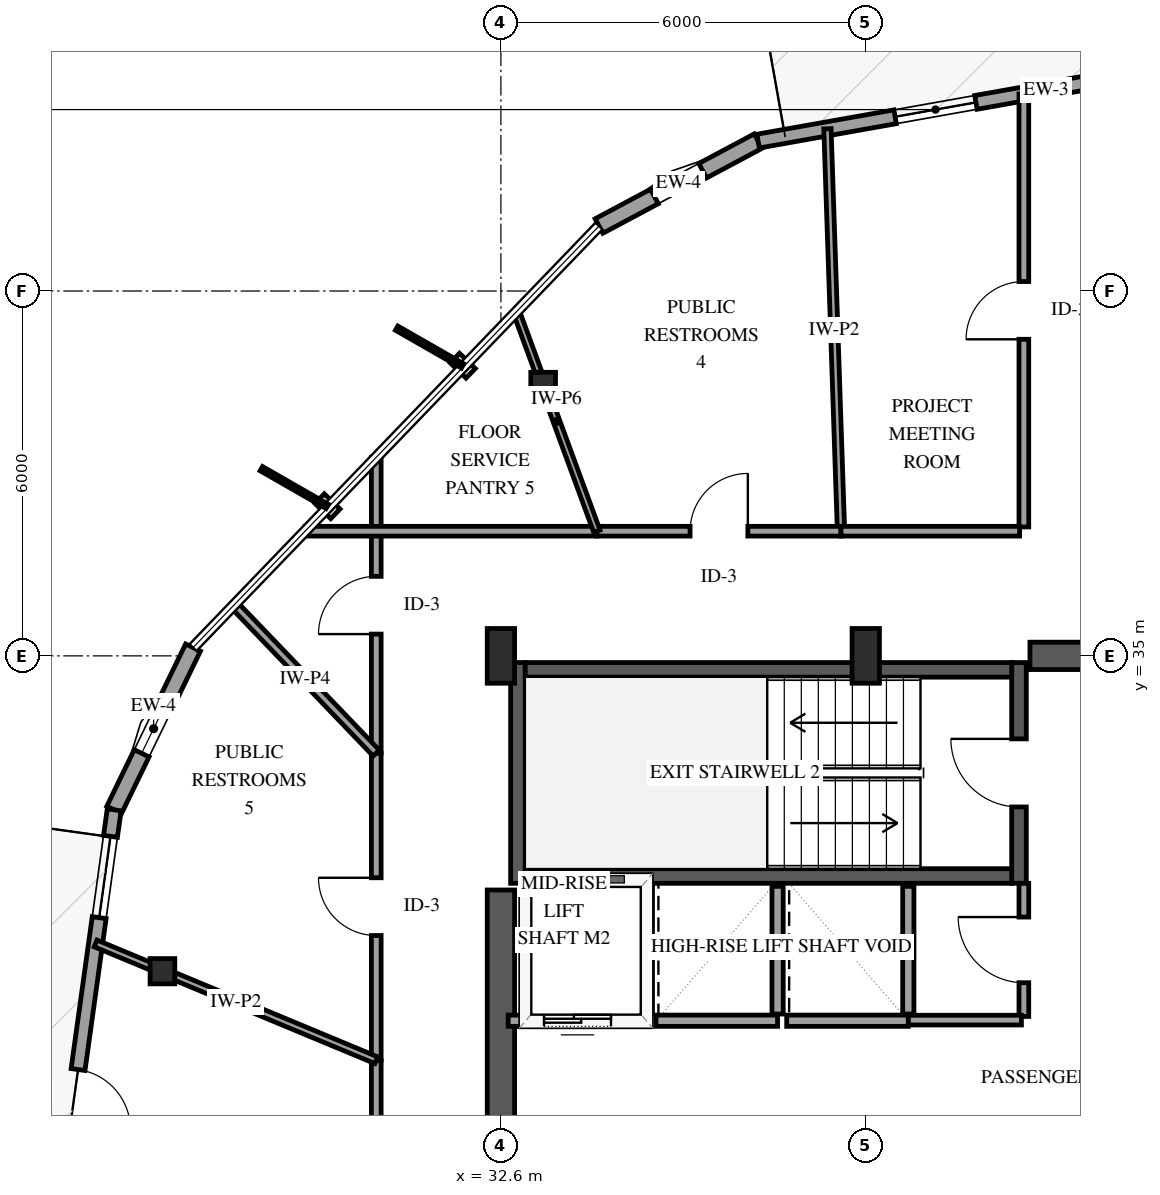
"""IFC4 building model, lengths in metres.
Left out: names, types, materials, properties, quantities, classifications, styles, units other than length and angle.
Written with IfcOpenShell. Run it as: python <this file> out.ifc"""

import sys

from ifc_helpers import new_model, si_unit, direction, frame, frame_2d, origin, origin_2d, place, context, subcontext, project, spatial, rectangle, i_section, extrude, element, fill, save


model = new_model("IFC4")
c1 = context("Model", 3, precision=1e-05, world=origin(), true_north=direction((0.0, 1.0)))
c2 = subcontext(c1, "Body", "Model", "MODEL_VIEW")
j1 = project(units=[si_unit("LENGTHUNIT", "METRE"), si_unit("PLANEANGLEUNIT", "RADIAN")], contexts=[c1])
p1 = place(None, origin())
s1 = spatial("IfcSite", under=j1, at=p1, CompositionType="ELEMENT")
p2 = place(p1, origin())
s2 = spatial("IfcBuilding", under=s1, at=p2, CompositionType="ELEMENT")
p3 = place(p2, frame((0.0, 0.0, 205.0)))
s3 = spatial("IfcBuildingStorey", under=s2, at=p3, CompositionType="ELEMENT", Elevation=205.0)
p4 = place(p3, frame((32.88, 31.26, 0.0), z_axis=(0.0, 0.0, 1.0), x_axis=(0.0, 1.0, 0.0)))
e1 = element("IfcWall", 1, at=p4, inside=s3, PredefinedType="SHEAR", context=c2, shape_type="SweptSolid", body=[
    extrude(rectangle(XDim=3.63, YDim=0.24, at=frame_2d((1.815, 0.0))), origin(), (0.0, 0.0, 1.0), 3.6),
])
p5 = place(p3, frame((41.12, 31.26, 0.0), z_axis=(0.0, 0.0, 1.0), x_axis=(0.0, 1.0, 0.0)))
e2 = element("IfcWall", 2, at=p5, inside=s3, PredefinedType="SHEAR", context=c2, shape_type="SweptSolid", body=[
    extrude(rectangle(XDim=3.63, YDim=0.24, at=frame_2d((1.815, 0.0))), origin(), (0.0, 0.0, 1.0), 3.6),
])
p6 = place(p5, frame((1.255, 0.0, 0.0)))
e3 = element("IfcOpeningElement", 3, at=p6, cuts=e2, PredefinedType="OPENING", context=c2, shape_type="SweptSolid", body=[
    extrude(rectangle(XDim=1.12, YDim=2.15, at=frame_2d((0.56, 1.075))), frame((0.0, 0.13, 0.0), z_axis=(0.0, -1.0, 0.0), x_axis=(1.0, 0.0, 0.0)), (0.0, 0.0, 1.0), 0.26),
])
for number, where, z_axis, x_axis in (
    (4, (33.0, 31.38, 0.0), (0.0, 0.0, 1.0), (1.0, 0.0, 0.0)),
    (5, (33.0, 34.77, 0.0), (0.0, 0.0, 1.0), (1.0, 0.0, 0.0)),
):
    element("IfcWall", number, at=place(p3, frame(where, z_axis=z_axis, x_axis=x_axis)), inside=s3, PredefinedType="SHEAR", context=c2, shape_type="SweptSolid", body=[
        extrude(rectangle(XDim=8.0, YDim=0.24, at=frame_2d((4.0, 0.0))), origin(), (0.0, 0.0, 1.0), 3.6),
    ])
p7 = place(p3, frame((32.6, 18.85, 0.0), z_axis=(0.0, 0.0, 1.0), x_axis=(0.0, 1.0, 0.0)))
e6 = element("IfcWall", 6, at=p7, inside=s3, PredefinedType="SHEAR", context=c2, shape_type="SweptSolid", body=[
    extrude(rectangle(XDim=12.3, YDim=0.45, at=frame_2d((6.15, 0.0))), origin(), (0.0, 0.0, 1.0), 3.6),
])
p8 = place(p3, frame((41.3, 35.0, 0.0), z_axis=(0.0, 0.0, 1.0), x_axis=(1.0, 0.0, 0.0)))
e7 = element("IfcWall", 7, at=p8, inside=s3, PredefinedType="SHEAR", context=c2, shape_type="SweptSolid", body=[
    extrude(rectangle(XDim=2.85, YDim=0.45, at=frame_2d((1.425, 0.0))), origin(), (0.0, 0.0, 1.0), 3.6),
])
for number, where, z_axis, x_axis in (
    (8, (32.6, 35.0, 0.0), (0.0, 0.0, 1.0), (1.0, 0.0, 0.0)),
    (9, (38.6, 35.0, 0.0), (0.0, 0.0, 1.0), (1.0, 0.0, 0.0)),
):
    element("IfcColumn", number, at=place(p3, frame(where, z_axis=z_axis, x_axis=x_axis)), inside=s3, PredefinedType="PILASTER", context=c2, shape_type="SweptSolid", body=[
        extrude(rectangle(XDim=0.45, YDim=0.9, at=origin_2d()), origin(), (0.0, 0.0, 1.0), 3.6),
    ])
for number, where, z_axis, x_axis in (
    (10, (33.295, 39.455, 0.0), (0.0, 0.0, 1.0), (1.0, 0.0, 0.0)),
    (11, (27.034, 29.814, 0.0), (0.0, 0.0, 1.0), (1.0, 0.0, 0.0)),
):
    element("IfcColumn", number, at=place(p3, frame(where, z_axis=z_axis, x_axis=x_axis)), inside=s3, PredefinedType="COLUMN", context=c2, shape_type="SweptSolid", body=[
        extrude(i_section(OverallWidth=0.406, OverallDepth=0.416, WebThickness=0.03, FlangeThickness=0.048, FilletRadius=0.038, at=origin_2d()), origin(), (0.0, 0.0, 1.0), 3.6),
    ])
p9 = place(p3, frame((36.83, 43.465, 0.0), z_axis=(0.0, 0.0, 1.0), x_axis=(-0.882280032982, -0.470724912663, 0.0)))
e12 = element("IfcWall", 12, at=p9, inside=s3, PredefinedType="SOLIDWALL", context=c2, shape_type="SweptSolid", body=[
    extrude(rectangle(XDim=2.967, YDim=0.27, at=frame_2d((1.483, 0.0))), origin(), (0.0, 0.0, 1.0), 2.679),
])
p10 = place(p9, frame((1.033, 0.0, 0.75)))
e13 = element("IfcOpeningElement", 13, at=p10, cuts=e12, PredefinedType="OPENING", context=c2, shape_type="SweptSolid", body=[
    extrude(rectangle(XDim=0.9, YDim=1.5, at=frame_2d((0.45, 0.75))), frame((0.0, 0.145, 0.0), z_axis=(0.0, -1.0, 0.0), x_axis=(1.0, 0.0, 0.0)), (0.0, 0.0, 1.0), 0.29),
])
p11 = place(p3, frame((46.306, 45.149, 0.0), z_axis=(0.0, 0.0, 1.0), x_axis=(-0.984566490569, -0.175010930084, 0.0)))
e14 = element("IfcWall", 14, at=p11, inside=s3, PredefinedType="SOLIDWALL", context=c2, shape_type="SweptSolid", body=[
    extrude(rectangle(XDim=9.624, YDim=0.23, at=frame_2d((4.812, 0.0))), origin(), (0.0, 0.0, 1.0), 2.679),
])
p12 = place(p11, frame((0.65, 0.0, 0.0)))
e15 = element("IfcOpeningElement", 15, at=p12, cuts=e14, PredefinedType="OPENING", context=c2, shape_type="SweptSolid", body=[
    extrude(rectangle(XDim=1.0, YDim=2.15, at=frame_2d((0.5, 1.075))), frame((0.0, 0.125, 0.0), z_axis=(0.0, -1.0, 0.0), x_axis=(1.0, 0.0, 0.0)), (0.0, 0.0, 1.0), 0.25),
])
p13 = place(p11, frame((5.986, 0.0, 0.72)))
e16 = element("IfcOpeningElement", 16, at=p13, cuts=e14, PredefinedType="OPENING", context=c2, shape_type="SweptSolid", body=[
    extrude(rectangle(XDim=1.35, YDim=1.65, at=frame_2d((0.675, 0.825))), frame((0.0, 0.125, 0.0), z_axis=(0.0, -1.0, 0.0), x_axis=(1.0, 0.0, 0.0)), (0.0, 0.0, 1.0), 0.25),
])
p14 = place(p3, frame((27.537, 35.136, 0.0), z_axis=(0.0, 0.0, 1.0), x_axis=(-0.437111339514, -0.899407403165, 0.0)))
e17 = element("IfcWall", 17, at=p14, inside=s3, PredefinedType="SOLIDWALL", context=c2, shape_type="SweptSolid", body=[
    extrude(rectangle(XDim=2.966, YDim=0.27, at=frame_2d((1.483, 0.0))), origin(), (0.0, 0.0, 1.0), 2.679),
])
p15 = place(p14, frame((1.033, 0.0, 0.75)))
e18 = element("IfcOpeningElement", 18, at=p15, cuts=e17, PredefinedType="OPENING", context=c2, shape_type="SweptSolid", body=[
    extrude(rectangle(XDim=0.9, YDim=1.5, at=frame_2d((0.45, 0.75))), frame((0.0, 0.145, 0.0), z_axis=(0.0, -1.0, 0.0), x_axis=(1.0, 0.0, 0.0)), (0.0, 0.0, 1.0), 0.29),
])
p16 = place(p3, frame((26.24, 32.468, 0.0), z_axis=(0.0, 0.0, 1.0), x_axis=(-0.137794425401, -0.990460850477, 0.0)))
e19 = element("IfcWall", 19, at=p16, inside=s3, PredefinedType="SOLIDWALL", context=c2, shape_type="SweptSolid", body=[
    extrude(rectangle(XDim=9.624, YDim=0.23, at=frame_2d((4.812, 0.0))), origin(), (0.0, 0.0, 1.0), 2.679),
])
p17 = place(p16, frame((4.312, 0.0, 0.0)))
e20 = element("IfcOpeningElement", 20, at=p17, cuts=e19, PredefinedType="OPENING", context=c2, shape_type="SweptSolid", body=[
    extrude(rectangle(XDim=1.0, YDim=2.15, at=frame_2d((0.5, 1.075))), frame((0.0, 0.125, 0.0), z_axis=(0.0, -1.0, 0.0), x_axis=(1.0, 0.0, 0.0)), (0.0, 0.0, 1.0), 0.25),
])
p18 = place(p16, frame((0.44, 0.0, 0.72)))
e21 = element("IfcOpeningElement", 21, at=p18, cuts=e19, PredefinedType="OPENING", context=c2, shape_type="SweptSolid", body=[
    extrude(rectangle(XDim=1.35, YDim=1.65, at=frame_2d((0.675, 0.825))), frame((0.0, 0.125, 0.0), z_axis=(0.0, -1.0, 0.0), x_axis=(1.0, 0.0, 0.0)), (0.0, 0.0, 1.0), 0.25),
])
p19 = place(p16, frame((5.952, 0.0, 0.72)))
e22 = element("IfcOpeningElement", 22, at=p19, cuts=e19, PredefinedType="OPENING", context=c2, shape_type="SweptSolid", body=[
    extrude(rectangle(XDim=1.35, YDim=1.65, at=frame_2d((0.675, 0.825))), frame((0.0, 0.125, 0.0), z_axis=(0.0, -1.0, 0.0), x_axis=(1.0, 0.0, 0.0)), (0.0, 0.0, 1.0), 0.25),
])
p20 = place(p3, frame((32.72, 29.0, 0.0), z_axis=(0.0, 0.0, 1.0), x_axis=(1.0, 0.0, 0.0)))
e23 = element("IfcWall", 23, at=p20, inside=s3, PredefinedType="SOLIDWALL", context=c2, shape_type="SweptSolid", body=[
    extrude(rectangle(XDim=2.28, YDim=0.185, at=frame_2d((1.14, 0.0))), origin(), (0.0, 0.0, 1.0), 3.3),
])
p21 = place(p20, frame((0.59, 0.0, 0.0)))
e24 = element("IfcOpeningElement", 24, at=p21, cuts=e23, PredefinedType="OPENING", context=c2, shape_type="SweptSolid", body=[
    extrude(rectangle(XDim=1.1, YDim=2.15, at=frame_2d((0.55, 1.075))), frame((0.0, 0.103, 0.0), z_axis=(0.0, -1.0, 0.0), x_axis=(1.0, 0.0, 0.0)), (0.0, 0.0, 1.0), 0.205),
])
p22 = place(p3, frame((35.0, 29.11, 0.0), z_axis=(0.0, 0.0, 1.0), x_axis=(0.0, 1.0, 0.0)))
e25 = element("IfcWall", 25, at=p22, inside=s3, PredefinedType="SOLIDWALL", context=c2, shape_type="SweptSolid", body=[
    extrude(rectangle(XDim=2.1, YDim=0.185, at=frame_2d((1.05, 0.0))), origin(), (0.0, 0.0, 1.0), 3.3),
])
p23 = place(p3, frame((35.15, 29.0, 0.0), z_axis=(0.0, 0.0, 1.0), x_axis=(1.0, 0.0, 0.0)))
e26 = element("IfcWall", 26, at=p23, inside=s3, PredefinedType="SOLIDWALL", context=c2, shape_type="SweptSolid", body=[
    extrude(rectangle(XDim=2.0, YDim=0.185, at=frame_2d((1.0, 0.0))), origin(), (0.0, 0.0, 1.0), 3.3),
])
p24 = place(p3, frame((37.15, 29.11, 0.0), z_axis=(0.0, 0.0, 1.0), x_axis=(0.0, 1.0, 0.0)))
e27 = element("IfcWall", 27, at=p24, inside=s3, PredefinedType="SOLIDWALL", context=c2, shape_type="SweptSolid", body=[
    extrude(rectangle(XDim=2.1, YDim=0.185, at=frame_2d((1.05, 0.0))), origin(), (0.0, 0.0, 1.0), 3.3),
])
p25 = place(p3, frame((37.3, 29.0, 0.0), z_axis=(0.0, 0.0, 1.0), x_axis=(1.0, 0.0, 0.0)))
e28 = element("IfcWall", 28, at=p25, inside=s3, PredefinedType="SOLIDWALL", context=c2, shape_type="SweptSolid", body=[
    extrude(rectangle(XDim=2.0, YDim=0.185, at=frame_2d((1.0, 0.0))), origin(), (0.0, 0.0, 1.0), 3.3),
])
p26 = place(p3, frame((39.3, 29.11, 0.0), z_axis=(0.0, 0.0, 1.0), x_axis=(0.0, 1.0, 0.0)))
e29 = element("IfcWall", 29, at=p26, inside=s3, PredefinedType="SOLIDWALL", context=c2, shape_type="SweptSolid", body=[
    extrude(rectangle(XDim=2.1, YDim=0.185, at=frame_2d((1.05, 0.0))), origin(), (0.0, 0.0, 1.0), 3.3),
])
p27 = place(p3, frame((30.55, 20.106, 0.0), z_axis=(0.0, 0.0, 1.0), x_axis=(0.0, 1.0, 0.0)))
e30 = element("IfcWall", 30, at=p27, inside=s3, PredefinedType="PARTITIONING", context=c2, shape_type="SweptSolid", body=[
    extrude(rectangle(XDim=8.245, YDim=0.16, at=frame_2d((4.123, 0.0))), origin(), (0.0, 0.0, 1.0), 3.3),
])
p28 = place(p27, frame((3.647, 0.0, 0.0)))
e31 = element("IfcOpeningElement", 31, at=p28, cuts=e30, PredefinedType="OPENING", context=c2, shape_type="SweptSolid", body=[
    extrude(rectangle(XDim=0.95, YDim=2.15, at=frame_2d((0.475, 1.075))), frame((0.0, 0.09, 0.0), z_axis=(0.0, -1.0, 0.0), x_axis=(1.0, 0.0, 0.0)), (0.0, 0.0, 1.0), 0.18),
])
p29 = place(p3, frame((41.2, 37.12, 0.0), z_axis=(0.0, 0.0, 1.0), x_axis=(0.0, 1.0, 0.0)))
e32 = element("IfcWall", 32, at=p29, inside=s3, PredefinedType="PARTITIONING", context=c2, shape_type="SweptSolid", body=[
    extrude(rectangle(XDim=7.122, YDim=0.16, at=frame_2d((3.561, 0.0))), origin(), (0.0, 0.0, 1.0), 3.3),
])
p30 = place(p29, frame((3.086, 0.0, 0.0)))
e33 = element("IfcOpeningElement", 33, at=p30, cuts=e32, PredefinedType="OPENING", context=c2, shape_type="SweptSolid", body=[
    extrude(rectangle(XDim=0.95, YDim=2.15, at=frame_2d((0.475, 1.075))), frame((0.0, 0.09, 0.0), z_axis=(0.0, -1.0, 0.0), x_axis=(1.0, 0.0, 0.0)), (0.0, 0.0, 1.0), 0.18),
])
p31 = place(p3, frame((38.193, 37.05, 0.0), z_axis=(0.0, 0.0, 1.0), x_axis=(-0.033699076648, 0.999432024819, 0.0)))
e34 = element("IfcWall", 34, at=p31, inside=s3, PredefinedType="PARTITIONING", context=c2, shape_type="SweptSolid", body=[
    extrude(rectangle(XDim=6.622, YDim=0.12, at=frame_2d((3.311, 0.0))), origin(), (0.0, 0.0, 1.0), 3.3),
])
p32 = place(p3, frame((30.55, 28.351, 0.0), z_axis=(0.0, 0.0, 1.0), x_axis=(0.0, 1.0, 0.0)))
e35 = element("IfcWall", 35, at=p32, inside=s3, PredefinedType="PARTITIONING", context=c2, shape_type="SweptSolid", body=[
    extrude(rectangle(XDim=5.05, YDim=0.16, at=frame_2d((2.525, 0.0))), origin(), (0.0, 0.0, 1.0), 3.3),
])
p33 = place(p32, frame((2.05, 0.0, 0.0)))
e36 = element("IfcOpeningElement", 36, at=p33, cuts=e35, PredefinedType="OPENING", context=c2, shape_type="SweptSolid", body=[
    extrude(rectangle(XDim=0.95, YDim=2.15, at=frame_2d((0.475, 1.075))), frame((0.0, 0.09, 0.0), z_axis=(0.0, -1.0, 0.0), x_axis=(1.0, 0.0, 0.0)), (0.0, 0.0, 1.0), 0.18),
])
p34 = place(p3, frame((30.55, 28.351, 0.0), z_axis=(0.0, 0.0, 1.0), x_axis=(-0.923289208282, 0.384105503567, 0.0)))
e37 = element("IfcWall", 37, at=p34, inside=s3, PredefinedType="PARTITIONING", context=c2, shape_type="SweptSolid", body=[
    extrude(rectangle(XDim=4.999, YDim=0.12, at=frame_2d((2.499, 0.0))), origin(), (0.0, 0.0, 1.0), 3.3),
])
p35 = place(p3, frame((30.55, 33.401, 0.0), z_axis=(0.0, 0.0, 1.0), x_axis=(0.0, 1.0, 0.0)))
e38 = element("IfcWall", 38, at=p35, inside=s3, PredefinedType="PARTITIONING", context=c2, shape_type="SweptSolid", body=[
    extrude(rectangle(XDim=4.864, YDim=0.16, at=frame_2d((2.432, 0.0))), origin(), (0.0, 0.0, 1.0), 3.3),
])
p36 = place(p35, frame((1.957, 0.0, 0.0)))
e39 = element("IfcOpeningElement", 39, at=p36, cuts=e38, PredefinedType="OPENING", context=c2, shape_type="SweptSolid", body=[
    extrude(rectangle(XDim=0.95, YDim=2.15, at=frame_2d((0.475, 1.075))), frame((0.0, 0.09, 0.0), z_axis=(0.0, -1.0, 0.0), x_axis=(1.0, 0.0, 0.0)), (0.0, 0.0, 1.0), 0.18),
])
p37 = place(p3, frame((29.38, 37.05, 0.0), z_axis=(0.0, 0.0, 1.0), x_axis=(1.0, 0.0, 0.0)))
e40 = element("IfcWall", 40, at=p37, inside=s3, PredefinedType="PARTITIONING", context=c2, shape_type="SweptSolid", body=[
    extrude(rectangle(XDim=4.798, YDim=0.16, at=frame_2d((2.399, 0.0))), origin(), (0.0, 0.0, 1.0), 3.3),
])
p38 = place(p3, frame((34.178, 37.05, 0.0), z_axis=(0.0, 0.0, 1.0), x_axis=(1.0, 0.0, 0.0)))
e41 = element("IfcWall", 41, at=p38, inside=s3, PredefinedType="PARTITIONING", context=c2, shape_type="SweptSolid", body=[
    extrude(rectangle(XDim=4.015, YDim=0.16, at=frame_2d((2.008, 0.0))), origin(), (0.0, 0.0, 1.0), 3.3),
])
p39 = place(p38, frame((1.533, 0.0, 0.0)))
e42 = element("IfcOpeningElement", 42, at=p39, cuts=e41, PredefinedType="OPENING", context=c2, shape_type="SweptSolid", body=[
    extrude(rectangle(XDim=0.95, YDim=2.15, at=frame_2d((0.475, 1.075))), frame((0.0, 0.09, 0.0), z_axis=(0.0, -1.0, 0.0), x_axis=(1.0, 0.0, 0.0)), (0.0, 0.0, 1.0), 0.18),
])
p40 = place(p3, frame((34.178, 37.05, 0.0), z_axis=(0.0, 0.0, 1.0), x_axis=(-0.344807180399, 0.938673536617, 0.0)))
e43 = element("IfcWall", 43, at=p40, inside=s3, PredefinedType="PARTITIONING", context=c2, shape_type="SweptSolid", body=[
    extrude(rectangle(XDim=3.843, YDim=0.11, at=frame_2d((1.921, 0.0))), origin(), (0.0, 0.0, 1.0), 2.595),
])
p41 = place(p3, frame((30.55, 33.401, 0.0), z_axis=(0.0, 0.0, 1.0), x_axis=(-0.691985428649, 0.721911467243, 0.0)))
e44 = element("IfcWall", 44, at=p41, inside=s3, PredefinedType="PARTITIONING", context=c2, shape_type="SweptSolid", body=[
    extrude(rectangle(XDim=3.377, YDim=0.14, at=frame_2d((1.689, 0.0))), origin(), (0.0, 0.0, 1.0), 3.3),
])
p42 = place(p3, frame((38.193, 37.05, 0.0), z_axis=(0.0, 0.0, 1.0), x_axis=(1.0, 0.0, 0.0)))
e45 = element("IfcWall", 45, at=p42, inside=s3, PredefinedType="PARTITIONING", context=c2, shape_type="SweptSolid", body=[
    extrude(rectangle(XDim=2.937, YDim=0.16, at=frame_2d((1.468, 0.0))), origin(), (0.0, 0.0, 1.0), 3.3),
])
p43 = place(p3, frame((41.2, 29.07, 0.0), z_axis=(0.0, 0.0, 1.0), x_axis=(0.0, 1.0, 0.0)))
e46 = element("IfcWall", 46, at=p43, inside=s3, PredefinedType="PARTITIONING", context=c2, shape_type="SweptSolid", body=[
    extrude(rectangle(XDim=2.19, YDim=0.16, at=frame_2d((1.095, 0.0))), origin(), (0.0, 0.0, 1.0), 3.3),
])
p44 = place(p43, frame((0.555, 0.0, 0.0)))
e47 = element("IfcOpeningElement", 47, at=p44, cuts=e46, PredefinedType="OPENING", context=c2, shape_type="SweptSolid", body=[
    extrude(rectangle(XDim=1.08, YDim=2.15, at=frame_2d((0.54, 1.075))), frame((0.0, 0.09, 0.0), z_axis=(0.0, -1.0, 0.0), x_axis=(1.0, 0.0, 0.0)), (0.0, 0.0, 1.0), 0.18),
])
p45 = place(p3, frame((39.3, 29.01, 0.0), z_axis=(0.0, 0.0, 1.0), x_axis=(1.0, 0.0, 0.0)))
e48 = element("IfcWall", 48, at=p45, inside=s3, PredefinedType="PARTITIONING", context=c2, shape_type="SweptSolid", body=[
    extrude(rectangle(XDim=1.86, YDim=0.16, at=frame_2d((0.93, 0.0))), origin(), (0.0, 0.0, 1.0), 3.3),
])
p46 = place(p10, origin())
e49 = element("IfcWindow", 49, at=p46, inside=s3, PartitioningType="SINGLE_PANEL", PredefinedType="WINDOW", context=c2, shape_type="SweptSolid", body=[
    extrude(rectangle(XDim=0.9, YDim=1.5, at=frame_2d((0.45, 0.75))), frame((0.0, 0.03, 0.0), z_axis=(0.0, -1.0, 0.0), x_axis=(1.0, 0.0, 0.0)), (0.0, 0.0, 1.0), 0.06),
])
fill(e13, e49)
p47 = place(p13, origin())
e50 = element("IfcWindow", 50, at=p47, inside=s3, PartitioningType="SINGLE_PANEL", PredefinedType="WINDOW", context=c2, shape_type="SweptSolid", body=[
    extrude(rectangle(XDim=1.35, YDim=1.65, at=frame_2d((0.675, 0.825))), frame((0.0, 0.03, 0.0), z_axis=(0.0, -1.0, 0.0), x_axis=(1.0, 0.0, 0.0)), (0.0, 0.0, 1.0), 0.06),
])
fill(e16, e50)
p48 = place(p15, origin())
e51 = element("IfcWindow", 51, at=p48, inside=s3, PartitioningType="SINGLE_PANEL", PredefinedType="WINDOW", context=c2, shape_type="SweptSolid", body=[
    extrude(rectangle(XDim=0.9, YDim=1.5, at=frame_2d((0.45, 0.75))), frame((0.0, 0.03, 0.0), z_axis=(0.0, -1.0, 0.0), x_axis=(1.0, 0.0, 0.0)), (0.0, 0.0, 1.0), 0.06),
])
fill(e18, e51)
p49 = place(p17, origin())
e52 = element("IfcDoor", 52, at=p49, inside=s3, OperationType="SINGLE_SWING_RIGHT", PredefinedType="DOOR", context=c2, shape_type="SweptSolid", body=[
    extrude(rectangle(XDim=1.0, YDim=2.15, at=frame_2d((0.5, 1.075))), frame((0.0, 0.025, 0.0), z_axis=(0.0, -1.0, 0.0), x_axis=(1.0, 0.0, 0.0)), (0.0, 0.0, 1.0), 0.05),
])
fill(e20, e52)
p50 = place(p18, origin())
e53 = element("IfcWindow", 53, at=p50, inside=s3, PartitioningType="SINGLE_PANEL", PredefinedType="WINDOW", context=c2, shape_type="SweptSolid", body=[
    extrude(rectangle(XDim=1.35, YDim=1.65, at=frame_2d((0.675, 0.825))), frame((0.0, 0.03, 0.0), z_axis=(0.0, -1.0, 0.0), x_axis=(1.0, 0.0, 0.0)), (0.0, 0.0, 1.0), 0.06),
])
fill(e21, e53)
p51 = place(p21, origin())
e54 = element("IfcDoor", 54, at=p51, inside=s3, OperationType="SLIDING_TO_LEFT", PredefinedType="DOOR", context=c2, shape_type="SweptSolid", body=[
    extrude(rectangle(XDim=1.1, YDim=2.15, at=frame_2d((0.55, 1.075))), frame((0.0, 0.025, 0.0), z_axis=(0.0, -1.0, 0.0), x_axis=(1.0, 0.0, 0.0)), (0.0, 0.0, 1.0), 0.05),
])
fill(e24, e54)
p52 = place(p6, origin())
e55 = element("IfcDoor", 55, at=p52, inside=s3, OperationType="SINGLE_SWING_RIGHT", PredefinedType="DOOR", context=c2, shape_type="SweptSolid", body=[
    extrude(rectangle(XDim=1.12, YDim=2.15, at=frame_2d((0.56, 1.075))), frame((0.0, 0.025, 0.0), z_axis=(0.0, -1.0, 0.0), x_axis=(1.0, 0.0, 0.0)), (0.0, 0.0, 1.0), 0.05),
])
fill(e3, e55)
p53 = place(p30, origin())
e56 = element("IfcDoor", 56, at=p53, inside=s3, OperationType="SINGLE_SWING_LEFT", PredefinedType="DOOR", context=c2, shape_type="SweptSolid", body=[
    extrude(rectangle(XDim=0.95, YDim=2.15, at=frame_2d((0.475, 1.075))), frame((0.0, 0.025, 0.0), z_axis=(0.0, -1.0, 0.0), x_axis=(1.0, 0.0, 0.0)), (0.0, 0.0, 1.0), 0.05),
])
fill(e33, e56)
p54 = place(p33, origin())
e57 = element("IfcDoor", 57, at=p54, inside=s3, OperationType="SINGLE_SWING_RIGHT", PredefinedType="DOOR", context=c2, shape_type="SweptSolid", body=[
    extrude(rectangle(XDim=0.95, YDim=2.15, at=frame_2d((0.475, 1.075))), frame((0.0, 0.025, 0.0), z_axis=(0.0, -1.0, 0.0), x_axis=(1.0, 0.0, 0.0)), (0.0, 0.0, 1.0), 0.05),
])
fill(e36, e57)
p55 = place(p36, origin())
e58 = element("IfcDoor", 58, at=p55, inside=s3, OperationType="SINGLE_SWING_LEFT", PredefinedType="DOOR", context=c2, shape_type="SweptSolid", body=[
    extrude(rectangle(XDim=0.95, YDim=2.15, at=frame_2d((0.475, 1.075))), frame((0.0, 0.025, 0.0), z_axis=(0.0, -1.0, 0.0), x_axis=(1.0, 0.0, 0.0)), (0.0, 0.0, 1.0), 0.05),
])
fill(e39, e58)
p56 = place(p39, origin())
e59 = element("IfcDoor", 59, at=p56, inside=s3, OperationType="SINGLE_SWING_RIGHT", PredefinedType="DOOR", context=c2, shape_type="SweptSolid", body=[
    extrude(rectangle(XDim=0.95, YDim=2.15, at=frame_2d((0.475, 1.075))), frame((0.0, 0.025, 0.0), z_axis=(0.0, -1.0, 0.0), x_axis=(1.0, 0.0, 0.0)), (0.0, 0.0, 1.0), 0.05),
])
fill(e42, e59)
p57 = place(p44, origin())
e60 = element("IfcDoor", 60, at=p57, inside=s3, OperationType="SINGLE_SWING_RIGHT", PredefinedType="DOOR", context=c2, shape_type="SweptSolid", body=[
    extrude(rectangle(XDim=1.08, YDim=2.15, at=frame_2d((0.54, 1.075))), frame((0.0, 0.025, 0.0), z_axis=(0.0, -1.0, 0.0), x_axis=(1.0, 0.0, 0.0)), (0.0, 0.0, 1.0), 0.05),
])
fill(e47, e60)
save(model, sys.argv[1])
